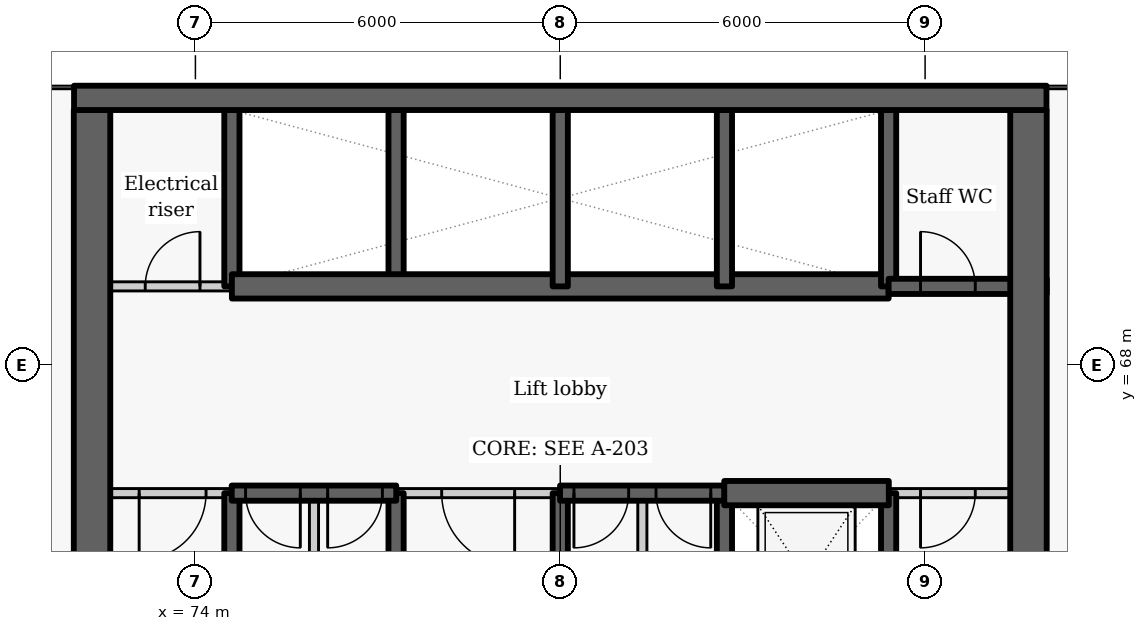
"""IFC4 building model, lengths in metres.
Left out: names, types, materials, properties, quantities, classifications, styles, units other than length and angle.
Written with IfcOpenShell. Run it as: python <this file> out.ifc"""

import sys

from ifc_helpers import new_model, si_unit, direction, frame, frame_2d, origin, place, context, subcontext, project, spatial, rectangle, extrude, element, fill, save


model = new_model("IFC4")
c1 = context("Model", 3, precision=1e-05, world=origin(), true_north=direction((0.0, 1.0)))
c2 = subcontext(c1, "Body", "Model", "MODEL_VIEW")
j1 = project(units=[si_unit("LENGTHUNIT", "METRE"), si_unit("PLANEANGLEUNIT", "RADIAN")], contexts=[c1])
p1 = place(None, origin())
s1 = spatial("IfcSite", under=j1, at=p1, CompositionType="ELEMENT")
p2 = place(p1, origin())
s2 = spatial("IfcBuilding", under=s1, at=p2, CompositionType="ELEMENT")
p3 = place(p2, frame((0.0, 0.0, 11.4)))
s3 = spatial("IfcBuildingStorey", under=s2, at=p3, CompositionType="ELEMENT", Elevation=11.4)
p4 = place(p3, frame((74.6, 63.1, -0.3), z_axis=(0.0, 0.0, 1.0), x_axis=(0.0, 1.0, 0.0)))
e1 = element("IfcWall", 1, at=p4, inside=s3, PredefinedType="SHEAR", context=c2, shape_type="SweptSolid", body=[
    extrude(rectangle(XDim=2.8, YDim=0.25, at=frame_2d((1.4, 0.0))), origin(), (0.0, 0.0, 1.0), 4.2),
])
p5 = place(p3, frame((74.6, 69.3, -0.3), z_axis=(0.0, 0.0, 1.0), x_axis=(0.0, 1.0, 0.0)))
e2 = element("IfcWall", 2, at=p5, inside=s3, PredefinedType="SHEAR", context=c2, shape_type="SweptSolid", body=[
    extrude(rectangle(XDim=2.9, YDim=0.25, at=frame_2d((1.45, 0.0))), origin(), (0.0, 0.0, 1.0), 4.2),
])
p6 = place(p3, frame((72.0, 69.3, 0.0), z_axis=(0.0, 0.0, 1.0), x_axis=(1.0, 0.0, 0.0)))
e3 = element("IfcWall", 3, at=p6, inside=s3, PredefinedType="PARTITIONING", context=c2, shape_type="SweptSolid", body=[
    extrude(rectangle(XDim=2.6, YDim=0.15, at=frame_2d((1.3, 0.0))), origin(), (0.0, 0.0, 1.0), 3.9),
])
p7 = place(p6, frame((1.175, 0.0, 0.0)))
e4 = element("IfcOpeningElement", 4, at=p7, cuts=e3, PredefinedType="OPENING", context=c2, shape_type="SweptSolid", body=[
    extrude(rectangle(XDim=0.9, YDim=2.1, at=frame_2d((0.45, 1.05))), frame((0.0, 0.085, 0.0), z_axis=(0.0, -1.0, 0.0), x_axis=(1.0, 0.0, 0.0)), (0.0, 0.0, 1.0), 0.17),
])
p8 = place(p3, frame((72.3, 63.1, -0.3), z_axis=(0.0, 0.0, 1.0), x_axis=(0.0, 1.0, 0.0)))
e5 = element("IfcWall", 5, at=p8, inside=s3, PredefinedType="SHEAR", context=c2, shape_type="SweptSolid", body=[
    extrude(rectangle(XDim=9.1, YDim=0.6, at=frame_2d((4.55, 0.0))), origin(), (0.0, 0.0, 1.0), 4.2),
])
p9 = place(p3, frame((77.3, 63.1, -0.3), z_axis=(0.0, 0.0, 1.0), x_axis=(0.0, 1.0, 0.0)))
e6 = element("IfcWall", 6, at=p9, inside=s3, PredefinedType="SHEAR", context=c2, shape_type="SweptSolid", body=[
    extrude(rectangle(XDim=2.8, YDim=0.25, at=frame_2d((1.4, 0.0))), origin(), (0.0, 0.0, 1.0), 4.2),
])
p10 = place(p3, frame((77.3, 69.3, -0.3), z_axis=(0.0, 0.0, 1.0), x_axis=(0.0, 1.0, 0.0)))
e7 = element("IfcWall", 7, at=p10, inside=s3, PredefinedType="SHEAR", context=c2, shape_type="SweptSolid", body=[
    extrude(rectangle(XDim=2.9, YDim=0.25, at=frame_2d((1.45, 0.0))), origin(), (0.0, 0.0, 1.0), 4.2),
])
p11 = place(p3, frame((74.6, 69.3, -0.3), z_axis=(0.0, 0.0, 1.0), x_axis=(1.0, 0.0, 0.0)))
e8 = element("IfcWall", 8, at=p11, inside=s3, PredefinedType="SHEAR", context=c2, shape_type="SweptSolid", body=[
    extrude(rectangle(XDim=10.8, YDim=0.4, at=frame_2d((5.4, 0.0))), origin(), (0.0, 0.0, 1.0), 4.2),
])
p12 = place(p3, frame((80.0, 63.1, -0.3), z_axis=(0.0, 0.0, 1.0), x_axis=(0.0, 1.0, 0.0)))
e9 = element("IfcWall", 9, at=p12, inside=s3, PredefinedType="SHEAR", context=c2, shape_type="SweptSolid", body=[
    extrude(rectangle(XDim=2.8, YDim=0.25, at=frame_2d((1.4, 0.0))), origin(), (0.0, 0.0, 1.0), 4.2),
])
p13 = place(p3, frame((80.0, 69.3, -0.3), z_axis=(0.0, 0.0, 1.0), x_axis=(0.0, 1.0, 0.0)))
e10 = element("IfcWall", 10, at=p13, inside=s3, PredefinedType="SHEAR", context=c2, shape_type="SweptSolid", body=[
    extrude(rectangle(XDim=2.9, YDim=0.25, at=frame_2d((1.45, 0.0))), origin(), (0.0, 0.0, 1.0), 4.2),
])
p14 = place(p3, frame((82.7, 63.1, -0.3), z_axis=(0.0, 0.0, 1.0), x_axis=(0.0, 1.0, 0.0)))
e11 = element("IfcWall", 11, at=p14, inside=s3, PredefinedType="SHEAR", context=c2, shape_type="SweptSolid", body=[
    extrude(rectangle(XDim=2.8, YDim=0.25, at=frame_2d((1.4, 0.0))), origin(), (0.0, 0.0, 1.0), 4.2),
])
p15 = place(p3, frame((82.7, 69.3, -0.3), z_axis=(0.0, 0.0, 1.0), x_axis=(0.0, 1.0, 0.0)))
e12 = element("IfcWall", 12, at=p15, inside=s3, PredefinedType="SHEAR", context=c2, shape_type="SweptSolid", body=[
    extrude(rectangle(XDim=2.9, YDim=0.25, at=frame_2d((1.45, 0.0))), origin(), (0.0, 0.0, 1.0), 4.2),
])
p16 = place(p3, frame((85.4, 63.1, -0.3), z_axis=(0.0, 0.0, 1.0), x_axis=(0.0, 1.0, 0.0)))
e13 = element("IfcWall", 13, at=p16, inside=s3, PredefinedType="SHEAR", context=c2, shape_type="SweptSolid", body=[
    extrude(rectangle(XDim=2.8, YDim=0.25, at=frame_2d((1.4, 0.0))), origin(), (0.0, 0.0, 1.0), 4.2),
])
p17 = place(p3, frame((85.4, 69.3, -0.3), z_axis=(0.0, 0.0, 1.0), x_axis=(0.0, 1.0, 0.0)))
e14 = element("IfcWall", 14, at=p17, inside=s3, PredefinedType="SHEAR", context=c2, shape_type="SweptSolid", body=[
    extrude(rectangle(XDim=2.9, YDim=0.25, at=frame_2d((1.45, 0.0))), origin(), (0.0, 0.0, 1.0), 4.2),
])
p18 = place(p3, frame((85.4, 69.3, -0.3), z_axis=(0.0, 0.0, 1.0), x_axis=(1.0, 0.0, 0.0)))
e15 = element("IfcWall", 15, at=p18, inside=s3, PredefinedType="SHEAR", context=c2, shape_type="SweptSolid", body=[
    extrude(rectangle(XDim=2.6, YDim=0.25, at=frame_2d((1.3, 0.0))), origin(), (0.0, 0.0, 1.0), 4.2),
])
p19 = place(p18, frame((0.525, 0.0, 0.3)))
e16 = element("IfcOpeningElement", 16, at=p19, cuts=e15, PredefinedType="OPENING", context=c2, shape_type="SweptSolid", body=[
    extrude(rectangle(XDim=0.9, YDim=2.1, at=frame_2d((0.45, 1.05))), frame((0.0, 0.135, 0.0), z_axis=(0.0, -1.0, 0.0), x_axis=(1.0, 0.0, 0.0)), (0.0, 0.0, 1.0), 0.27),
])
p20 = place(p3, frame((87.7, 72.2, -0.3), z_axis=(0.0, 0.0, 1.0), x_axis=(0.0, -1.0, 0.0)))
e17 = element("IfcWall", 17, at=p20, inside=s3, PredefinedType="SHEAR", context=c2, shape_type="SweptSolid", body=[
    extrude(rectangle(XDim=15.6, YDim=0.6, at=frame_2d((7.8, 0.0))), origin(), (0.0, 0.0, 1.0), 4.2),
])
p21 = place(p20, frame((11.8, 0.0, 0.3)))
e18 = element("IfcOpeningElement", 18, at=p21, cuts=e17, PredefinedType="OPENING", context=c2, shape_type="SweptSolid", body=[
    extrude(rectangle(XDim=1.1, YDim=2.1, at=frame_2d((0.55, 1.05))), frame((0.0, 0.31, 0.0), z_axis=(0.0, -1.0, 0.0), x_axis=(1.0, 0.0, 0.0)), (0.0, 0.0, 1.0), 0.62),
])
p22 = place(p3, frame((74.603, 65.9, 0.0), z_axis=(0.0, 0.0, 1.0), x_axis=(-1.0, 0.0, 0.0)))
e19 = element("IfcWall", 19, at=p22, inside=s3, PredefinedType="PARTITIONING", context=c2, shape_type="SweptSolid", body=[
    extrude(rectangle(XDim=2.603, YDim=0.15, at=frame_2d((1.302, 0.0))), origin(), (0.0, 0.0, 1.0), 3.9),
])
p23 = place(p22, frame((0.428, 0.0, 0.0)))
e20 = element("IfcOpeningElement", 20, at=p23, cuts=e19, PredefinedType="OPENING", context=c2, shape_type="SweptSolid", body=[
    extrude(rectangle(XDim=1.1, YDim=2.1, at=frame_2d((0.55, 1.05))), frame((0.0, 0.085, 0.0), z_axis=(0.0, -1.0, 0.0), x_axis=(1.0, 0.0, 0.0)), (0.0, 0.0, 1.0), 0.17),
])
p24 = place(p3, frame((80.003, 65.9, 0.0), z_axis=(0.0, 0.0, 1.0), x_axis=(-1.0, 0.0, 0.0)))
e21 = element("IfcWall", 21, at=p24, inside=s3, PredefinedType="PARTITIONING", context=c2, shape_type="SweptSolid", body=[
    extrude(rectangle(XDim=2.706, YDim=0.15, at=frame_2d((1.353, 0.0))), origin(), (0.0, 0.0, 1.0), 3.9),
])
p25 = place(p24, frame((0.753, 0.0, 0.0)))
e22 = element("IfcOpeningElement", 22, at=p25, cuts=e21, PredefinedType="OPENING", context=c2, shape_type="SweptSolid", body=[
    extrude(rectangle(XDim=1.2, YDim=2.1, at=frame_2d((0.6, 1.05))), frame((0.0, 0.085, 0.0), z_axis=(0.0, -1.0, 0.0), x_axis=(1.0, 0.0, 0.0)), (0.0, 0.0, 1.0), 0.17),
])
p26 = place(p3, frame((88.0, 65.9, 0.0), z_axis=(0.0, 0.0, 1.0), x_axis=(-1.0, 0.0, 0.0)))
e23 = element("IfcWall", 23, at=p26, inside=s3, PredefinedType="PARTITIONING", context=c2, shape_type="SweptSolid", body=[
    extrude(rectangle(XDim=2.603, YDim=0.15, at=frame_2d((1.302, 0.0))), origin(), (0.0, 0.0, 1.0), 3.9),
])
p27 = place(p26, frame((1.175, 0.0, 0.0)))
e24 = element("IfcOpeningElement", 24, at=p27, cuts=e23, PredefinedType="OPENING", context=c2, shape_type="SweptSolid", body=[
    extrude(rectangle(XDim=0.9, YDim=2.1, at=frame_2d((0.45, 1.05))), frame((0.0, 0.085, 0.0), z_axis=(0.0, -1.0, 0.0), x_axis=(1.0, 0.0, 0.0)), (0.0, 0.0, 1.0), 0.17),
])
p28 = place(p3, frame((77.303, 65.9, -0.3), z_axis=(0.0, 0.0, 1.0), x_axis=(-1.0, 0.0, 0.0)))
e25 = element("IfcWall", 25, at=p28, inside=s3, PredefinedType="SHEAR", context=c2, shape_type="SweptSolid", body=[
    extrude(rectangle(XDim=2.706, YDim=0.25, at=frame_2d((1.353, 0.0))), origin(), (0.0, 0.0, 1.0), 4.2),
])
p29 = place(p28, frame((1.578, 0.0, 0.3)))
e26 = element("IfcOpeningElement", 26, at=p29, cuts=e25, PredefinedType="OPENING", context=c2, shape_type="SweptSolid", body=[
    extrude(rectangle(XDim=0.9, YDim=2.1, at=frame_2d((0.45, 1.05))), frame((0.0, 0.135, 0.0), z_axis=(0.0, -1.0, 0.0), x_axis=(1.0, 0.0, 0.0)), (0.0, 0.0, 1.0), 0.27),
])
p30 = place(p28, frame((0.228, 0.0, 0.3)))
e27 = element("IfcOpeningElement", 27, at=p30, cuts=e25, PredefinedType="OPENING", context=c2, shape_type="SweptSolid", body=[
    extrude(rectangle(XDim=0.9, YDim=2.1, at=frame_2d((0.45, 1.05))), frame((0.0, 0.135, 0.0), z_axis=(0.0, -1.0, 0.0), x_axis=(1.0, 0.0, 0.0)), (0.0, 0.0, 1.0), 0.27),
])
p31 = place(p3, frame((82.703, 65.9, -0.3), z_axis=(0.0, 0.0, 1.0), x_axis=(-1.0, 0.0, 0.0)))
e28 = element("IfcWall", 28, at=p31, inside=s3, PredefinedType="SHEAR", context=c2, shape_type="SweptSolid", body=[
    extrude(rectangle(XDim=2.706, YDim=0.25, at=frame_2d((1.353, 0.0))), origin(), (0.0, 0.0, 1.0), 4.2),
])
p32 = place(p31, frame((1.578, 0.0, 0.3)))
e29 = element("IfcOpeningElement", 29, at=p32, cuts=e28, PredefinedType="OPENING", context=c2, shape_type="SweptSolid", body=[
    extrude(rectangle(XDim=0.9, YDim=2.1, at=frame_2d((0.45, 1.05))), frame((0.0, 0.135, 0.0), z_axis=(0.0, -1.0, 0.0), x_axis=(1.0, 0.0, 0.0)), (0.0, 0.0, 1.0), 0.27),
])
p33 = place(p31, frame((0.228, 0.0, 0.3)))
e30 = element("IfcOpeningElement", 30, at=p33, cuts=e28, PredefinedType="OPENING", context=c2, shape_type="SweptSolid", body=[
    extrude(rectangle(XDim=0.9, YDim=2.1, at=frame_2d((0.45, 1.05))), frame((0.0, 0.135, 0.0), z_axis=(0.0, -1.0, 0.0), x_axis=(1.0, 0.0, 0.0)), (0.0, 0.0, 1.0), 0.27),
])
p34 = place(p3, frame((82.697, 65.9, -0.3), z_axis=(0.0, 0.0, 1.0), x_axis=(1.0, 0.0, 0.0)))
e31 = element("IfcWall", 31, at=p34, inside=s3, PredefinedType="SHEAR", context=c2, shape_type="SweptSolid", body=[
    extrude(rectangle(XDim=2.706, YDim=0.4, at=frame_2d((1.353, 0.0))), origin(), (0.0, 0.0, 1.0), 4.2),
])
for number, where, z_axis, x_axis in (
    (32, (75.95, 63.1, 0.0), (0.0, 0.0, 1.0), (0.0, 1.0, 0.0)),
    (33, (81.35, 63.1, 0.0), (0.0, 0.0, 1.0), (0.0, 1.0, 0.0)),
):
    element("IfcWall", number, at=place(p3, frame(where, z_axis=z_axis, x_axis=x_axis)), inside=s3, PredefinedType="PARTITIONING", context=c2, shape_type="SweptSolid", body=[
        extrude(rectangle(XDim=2.8, YDim=0.15, at=frame_2d((1.4, 0.0))), origin(), (0.0, 0.0, 1.0), 3.9),
    ])
p35 = place(p3, frame((72.004, 72.4, -0.3), z_axis=(0.0, 0.0, 1.0), x_axis=(1.0, 0.0, 0.0)))
e34 = element("IfcWall", 34, at=p35, inside=s3, PredefinedType="SHEAR", context=c2, shape_type="SweptSolid", body=[
    extrude(rectangle(XDim=15.992, YDim=0.4, at=frame_2d((7.996, 0.0))), origin(), (0.0, 0.0, 1.0), 4.2),
])
p36 = place(p7, origin())
e35 = element("IfcDoor", 35, at=p36, inside=s3, OperationType="SINGLE_SWING_RIGHT", PredefinedType="DOOR", context=c2, shape_type="SweptSolid", body=[
    extrude(rectangle(XDim=0.9, YDim=2.1, at=frame_2d((0.45, 1.05))), frame((0.0, 0.025, 0.0), z_axis=(0.0, -1.0, 0.0), x_axis=(1.0, 0.0, 0.0)), (0.0, 0.0, 1.0), 0.05),
])
fill(e4, e35)
p37 = place(p19, origin())
e36 = element("IfcDoor", 36, at=p37, inside=s3, OperationType="SINGLE_SWING_LEFT", PredefinedType="DOOR", context=c2, shape_type="SweptSolid", body=[
    extrude(rectangle(XDim=0.9, YDim=2.1, at=frame_2d((0.45, 1.05))), frame((0.0, 0.025, 0.0), z_axis=(0.0, -1.0, 0.0), x_axis=(1.0, 0.0, 0.0)), (0.0, 0.0, 1.0), 0.05),
])
fill(e16, e36)
p38 = place(p23, origin())
e37 = element("IfcDoor", 37, at=p38, inside=s3, OperationType="SINGLE_SWING_RIGHT", PredefinedType="DOOR", context=c2, shape_type="SweptSolid", body=[
    extrude(rectangle(XDim=1.1, YDim=2.1, at=frame_2d((0.55, 1.05))), frame((0.0, 0.025, 0.0), z_axis=(0.0, -1.0, 0.0), x_axis=(1.0, 0.0, 0.0)), (0.0, 0.0, 1.0), 0.05),
])
fill(e20, e37)
p39 = place(p29, origin())
e38 = element("IfcDoor", 38, at=p39, inside=s3, OperationType="SINGLE_SWING_LEFT", PredefinedType="DOOR", context=c2, shape_type="SweptSolid", body=[
    extrude(rectangle(XDim=0.9, YDim=2.1, at=frame_2d((0.45, 1.05))), frame((0.0, 0.025, 0.0), z_axis=(0.0, -1.0, 0.0), x_axis=(1.0, 0.0, 0.0)), (0.0, 0.0, 1.0), 0.05),
])
fill(e26, e38)
p40 = place(p30, origin())
e39 = element("IfcDoor", 39, at=p40, inside=s3, OperationType="SINGLE_SWING_RIGHT", PredefinedType="DOOR", context=c2, shape_type="SweptSolid", body=[
    extrude(rectangle(XDim=0.9, YDim=2.1, at=frame_2d((0.45, 1.05))), frame((0.0, 0.025, 0.0), z_axis=(0.0, -1.0, 0.0), x_axis=(1.0, 0.0, 0.0)), (0.0, 0.0, 1.0), 0.05),
])
fill(e27, e39)
p41 = place(p25, origin())
e40 = element("IfcDoor", 40, at=p41, inside=s3, OperationType="DOUBLE_DOOR_SINGLE_SWING", PredefinedType="DOOR", context=c2, shape_type="SweptSolid", body=[
    extrude(rectangle(XDim=1.2, YDim=2.1, at=frame_2d((0.6, 1.05))), frame((0.0, 0.025, 0.0), z_axis=(0.0, -1.0, 0.0), x_axis=(1.0, 0.0, 0.0)), (0.0, 0.0, 1.0), 0.05),
])
fill(e22, e40)
p42 = place(p32, origin())
e41 = element("IfcDoor", 41, at=p42, inside=s3, OperationType="SINGLE_SWING_RIGHT", PredefinedType="DOOR", context=c2, shape_type="SweptSolid", body=[
    extrude(rectangle(XDim=0.9, YDim=2.1, at=frame_2d((0.45, 1.05))), frame((0.0, 0.025, 0.0), z_axis=(0.0, -1.0, 0.0), x_axis=(1.0, 0.0, 0.0)), (0.0, 0.0, 1.0), 0.05),
])
fill(e29, e41)
p43 = place(p33, origin())
e42 = element("IfcDoor", 42, at=p43, inside=s3, OperationType="SINGLE_SWING_LEFT", PredefinedType="DOOR", context=c2, shape_type="SweptSolid", body=[
    extrude(rectangle(XDim=0.9, YDim=2.1, at=frame_2d((0.45, 1.05))), frame((0.0, 0.025, 0.0), z_axis=(0.0, -1.0, 0.0), x_axis=(1.0, 0.0, 0.0)), (0.0, 0.0, 1.0), 0.05),
])
fill(e30, e42)
p44 = place(p27, origin())
e43 = element("IfcDoor", 43, at=p44, inside=s3, OperationType="SINGLE_SWING_RIGHT", PredefinedType="DOOR", context=c2, shape_type="SweptSolid", body=[
    extrude(rectangle(XDim=0.9, YDim=2.1, at=frame_2d((0.45, 1.05))), frame((0.0, 0.025, 0.0), z_axis=(0.0, -1.0, 0.0), x_axis=(1.0, 0.0, 0.0)), (0.0, 0.0, 1.0), 0.05),
])
fill(e24, e43)
save(model, sys.argv[1])
